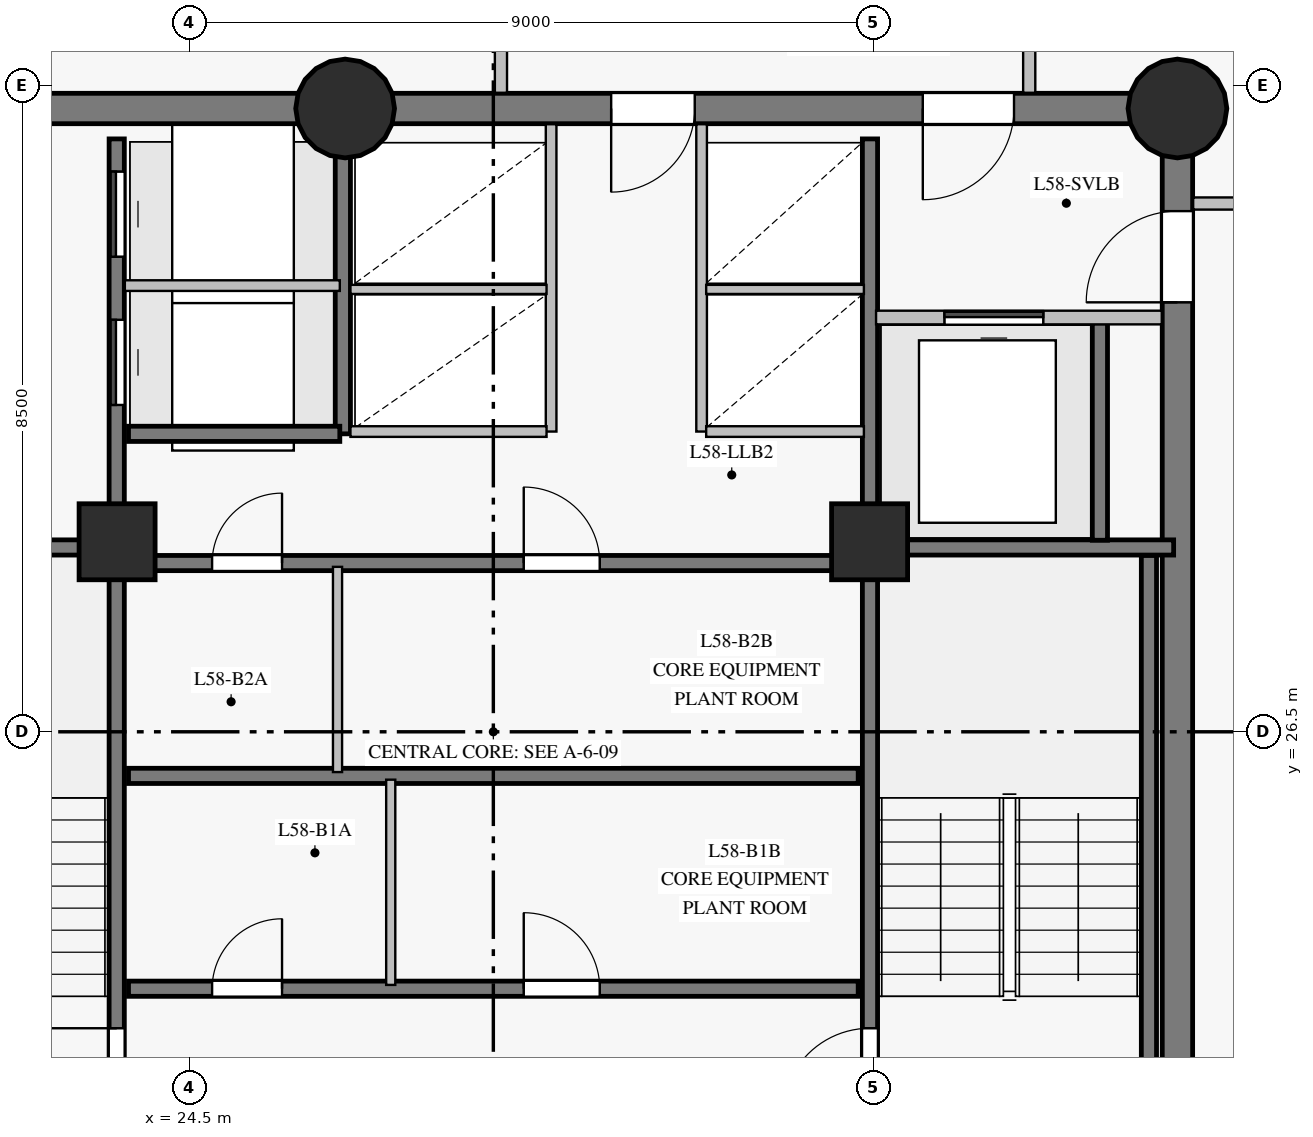
"""IFC4 building model, lengths in metres.
Left out: names, types, materials, properties, quantities, classifications, styles, units other than length and angle.
Written with IfcOpenShell. Run it as: python <this file> out.ifc"""

import sys

from ifc_helpers import new_model, si_unit, direction, frame, frame_2d, origin, origin_with_axes, origin_2d, place, context, subcontext, project, spatial, rectangle, circle, extrude, source, transform, mapped, element, fill, save


model = new_model("IFC4")
c1 = context("Model", 3, precision=1e-05, world=origin(), true_north=direction((0.0, 1.0)))
c2 = subcontext(c1, "Body", "Model", "MODEL_VIEW")
j1 = project(units=[si_unit("LENGTHUNIT", "METRE"), si_unit("PLANEANGLEUNIT", "RADIAN")], contexts=[c1])
p1 = place(None, origin())
s1 = spatial("IfcSite", under=j1, at=p1, CompositionType="ELEMENT")
p2 = place(p1, origin())
s2 = spatial("IfcBuilding", under=s1, at=p2, CompositionType="ELEMENT")
p3 = place(p2, frame((0.0, 0.0, 199.25)))
s3 = spatial("IfcBuildingStorey", under=s2, at=p3, CompositionType="ELEMENT", Elevation=199.25)
p4 = place(p3, frame((37.5, 18.3, 0.0), z_axis=(0.0, 0.0, 1.0), x_axis=(0.0, 1.0, 0.0)))
e1 = element("IfcWall", 1, at=p4, inside=s3, PredefinedType="SHEAR", context=c2, shape_type="SweptSolid", body=[
    extrude(rectangle(XDim=16.4, YDim=0.4, at=frame_2d((8.2, 0.0))), origin(), (0.0, 0.0, 1.0), 2.825),
])
p5 = place(p4, frame((13.85, 0.0, 0.0)))
e2 = element("IfcOpeningElement", 2, at=p5, cuts=e1, PredefinedType="OPENING", context=c2, shape_type="SweptSolid", body=[
    extrude(rectangle(XDim=1.2, YDim=2.15, at=frame_2d((0.6, 1.075))), frame((0.0, 0.21, 0.0), z_axis=(0.0, -1.0, 0.0), x_axis=(1.0, 0.0, 0.0)), (0.0, 0.0, 1.0), 0.42),
])
p6 = place(p3, frame((37.5, 34.7, 0.0), z_axis=(0.0, 0.0, 1.0), x_axis=(-1.0, 0.0, 0.0)))
e3 = element("IfcWall", 3, at=p6, inside=s3, PredefinedType="SHEAR", context=c2, shape_type="SweptSolid", body=[
    extrude(rectangle(XDim=10.95, YDim=0.4, at=frame_2d((5.475, 0.0))), origin(), (0.0, 0.0, 1.0), 2.825),
])
p7 = place(p6, frame((2.15, 0.0, 0.0)))
e4 = element("IfcOpeningElement", 4, at=p7, cuts=e3, PredefinedType="OPENING", context=c2, shape_type="SweptSolid", body=[
    extrude(rectangle(XDim=1.2, YDim=2.15, at=frame_2d((0.6, 1.075))), frame((0.0, 0.21, 0.0), z_axis=(0.0, -1.0, 0.0), x_axis=(1.0, 0.0, 0.0)), (0.0, 0.0, 1.0), 0.42),
])
p8 = place(p6, frame((6.35, 0.0, 0.0)))
e5 = element("IfcOpeningElement", 5, at=p8, cuts=e3, PredefinedType="OPENING", context=c2, shape_type="SweptSolid", body=[
    extrude(rectangle(XDim=1.1, YDim=2.15, at=frame_2d((0.55, 1.075))), frame((0.0, 0.21, 0.0), z_axis=(0.0, -1.0, 0.0), x_axis=(1.0, 0.0, 0.0)), (0.0, 0.0, 1.0), 0.42),
])
p9 = place(p3, frame((26.55, 34.7, 0.0), z_axis=(0.0, 0.0, 1.0), x_axis=(-1.0, 0.0, 0.0)))
e6 = element("IfcWall", 6, at=p9, inside=s3, PredefinedType="SHEAR", context=c2, shape_type="SweptSolid", body=[
    extrude(rectangle(XDim=7.05, YDim=0.4, at=frame_2d((3.525, 0.0))), origin(), (0.0, 0.0, 1.0), 2.825),
])
m1 = source(origin_with_axes(), c2, "Body", "SweptSolid", [
    extrude(circle(Radius=0.65, at=origin_2d()), origin(), (0.0, 0.0, 1.0), 3.05),
])
for number, where, z_axis, x_axis in (
    (7, (26.55, 34.7, 0.0), (0.0, 0.0, 1.0), (1.0, 0.0, 0.0)),
    (8, (37.5, 34.7, 0.0), (0.0, 0.0, 1.0), (1.0, 0.0, 0.0)),
):
    element("IfcColumn", number, at=place(p3, frame(where, z_axis=z_axis, x_axis=x_axis)), inside=s3, PredefinedType="COLUMN", context=c2, shape_type="MappedRepresentation", body=[
        mapped(m1, transform((0.0, 0.0, 0.0), scale=1.0)),
    ])
m2 = source(origin_with_axes(), c2, "Body", "SweptSolid", [
    extrude(rectangle(XDim=1.0, YDim=1.0, at=origin_2d()), origin(), (0.0, 0.0, 1.0), 3.05),
])
for number, where, z_axis, x_axis in (
    (9, (23.55, 29.0, 0.0), (0.0, 0.0, 1.0), (1.0, 0.0, 0.0)),
    (10, (33.45, 29.0, 0.0), (0.0, 0.0, 1.0), (1.0, 0.0, 0.0)),
):
    element("IfcColumn", number, at=place(p3, frame(where, z_axis=z_axis, x_axis=x_axis)), inside=s3, PredefinedType="COLUMN", context=c2, shape_type="MappedRepresentation", body=[
        mapped(m2, transform((0.0, 0.0, 0.0), scale=1.0)),
    ])
p10 = place(p3, frame((23.545, 18.7, 0.0), z_axis=(0.0, 0.0, 1.0), x_axis=(0.0, 1.0, 0.0)))
e11 = element("IfcWall", 11, at=p10, inside=s3, PredefinedType="SHEAR", context=c2, shape_type="SweptSolid", body=[
    extrude(rectangle(XDim=15.6, YDim=0.2, at=frame_2d((7.8, 0.0))), origin(), (0.0, 0.0, 1.0), 2.825),
])
p11 = place(p10, frame((2.75, 0.0, 0.0)))
e12 = element("IfcOpeningElement", 12, at=p11, cuts=e11, PredefinedType="OPENING", context=c2, shape_type="SweptSolid", body=[
    extrude(rectangle(XDim=1.15, YDim=2.15, at=frame_2d((0.575, 1.075))), frame((0.0, 0.11, 0.0), z_axis=(0.0, -1.0, 0.0), x_axis=(1.0, 0.0, 0.0)), (0.0, 0.0, 1.0), 0.22),
])
p12 = place(p10, frame((0.14, 0.0, 0.0)))
e13 = element("IfcOpeningElement", 13, at=p12, cuts=e11, PredefinedType="OPENING", context=c2, shape_type="SweptSolid", body=[
    extrude(rectangle(XDim=0.88, YDim=2.1, at=frame_2d((0.44, 1.05))), frame((0.0, 0.11, 0.0), z_axis=(0.0, -1.0, 0.0), x_axis=(1.0, 0.0, 0.0)), (0.0, 0.0, 1.0), 0.22),
])
p13 = place(p10, frame((1.36, 0.0, 0.0)))
e14 = element("IfcOpeningElement", 14, at=p13, cuts=e11, PredefinedType="OPENING", context=c2, shape_type="SweptSolid", body=[
    extrude(rectangle(XDim=0.88, YDim=2.1, at=frame_2d((0.44, 1.05))), frame((0.0, 0.11, 0.0), z_axis=(0.0, -1.0, 0.0), x_axis=(1.0, 0.0, 0.0)), (0.0, 0.0, 1.0), 0.22),
])
p14 = place(p10, frame((12.1, 0.0, 0.0)))
e15 = element("IfcOpeningElement", 15, at=p14, cuts=e11, PredefinedType="OPENING", context=c2, shape_type="SweptSolid", body=[
    extrude(rectangle(XDim=1.12, YDim=2.15, at=frame_2d((0.56, 1.075))), frame((0.0, 0.11, 0.0), z_axis=(0.0, -1.0, 0.0), x_axis=(1.0, 0.0, 0.0)), (0.0, 0.0, 1.0), 0.22),
])
p15 = place(p10, frame((14.05, 0.0, 0.0)))
e16 = element("IfcOpeningElement", 16, at=p15, cuts=e11, PredefinedType="OPENING", context=c2, shape_type="SweptSolid", body=[
    extrude(rectangle(XDim=1.12, YDim=2.15, at=frame_2d((0.56, 1.075))), frame((0.0, 0.11, 0.0), z_axis=(0.0, -1.0, 0.0), x_axis=(1.0, 0.0, 0.0)), (0.0, 0.0, 1.0), 0.22),
])
p16 = place(p3, frame((33.455, 18.7, 0.0), z_axis=(0.0, 0.0, 1.0), x_axis=(0.0, 1.0, 0.0)))
e17 = element("IfcWall", 17, at=p16, inside=s3, PredefinedType="SHEAR", context=c2, shape_type="SweptSolid", body=[
    extrude(rectangle(XDim=15.6, YDim=0.2, at=frame_2d((7.8, 0.0))), origin(), (0.0, 0.0, 1.0), 2.825),
])
p17 = place(p16, frame((2.75, 0.0, 0.0)))
e18 = element("IfcOpeningElement", 18, at=p17, cuts=e17, PredefinedType="OPENING", context=c2, shape_type="SweptSolid", body=[
    extrude(rectangle(XDim=1.15, YDim=2.15, at=frame_2d((0.575, 1.075))), frame((0.0, 0.11, 0.0), z_axis=(0.0, -1.0, 0.0), x_axis=(1.0, 0.0, 0.0)), (0.0, 0.0, 1.0), 0.22),
])
p18 = place(p16, frame((0.55, 0.0, 0.0)))
e19 = element("IfcOpeningElement", 19, at=p18, cuts=e17, PredefinedType="OPENING", context=c2, shape_type="SweptSolid", body=[
    extrude(rectangle(XDim=0.94, YDim=2.1, at=frame_2d((0.47, 1.05))), frame((0.0, 0.11, 0.0), z_axis=(0.0, -1.0, 0.0), x_axis=(1.0, 0.0, 0.0)), (0.0, 0.0, 1.0), 0.22),
])
p19 = place(p3, frame((23.7, 23.12, 0.0), z_axis=(0.0, 0.0, 1.0), x_axis=(1.0, 0.0, 0.0)))
e20 = element("IfcWall", 20, at=p19, inside=s3, PredefinedType="SHEAR", context=c2, shape_type="SweptSolid", body=[
    extrude(rectangle(XDim=9.6, YDim=0.2, at=frame_2d((4.8, 0.0))), origin(), (0.0, 0.0, 1.0), 2.825),
])
p20 = place(p19, frame((1.1, 0.0, 0.0)))
e21 = element("IfcOpeningElement", 21, at=p20, cuts=e20, PredefinedType="OPENING", context=c2, shape_type="SweptSolid", body=[
    extrude(rectangle(XDim=0.92, YDim=2.1, at=frame_2d((0.46, 1.05))), frame((0.0, 0.11, 0.0), z_axis=(0.0, -1.0, 0.0), x_axis=(1.0, 0.0, 0.0)), (0.0, 0.0, 1.0), 0.22),
])
p21 = place(p19, frame((5.2, 0.0, 0.0)))
e22 = element("IfcOpeningElement", 22, at=p21, cuts=e20, PredefinedType="OPENING", context=c2, shape_type="SweptSolid", body=[
    extrude(rectangle(XDim=1.0, YDim=2.15, at=frame_2d((0.5, 1.075))), frame((0.0, 0.11, 0.0), z_axis=(0.0, -1.0, 0.0), x_axis=(1.0, 0.0, 0.0)), (0.0, 0.0, 1.0), 0.22),
])
p22 = place(p3, frame((23.7, 25.92, 0.0), z_axis=(0.0, 0.0, 1.0), x_axis=(1.0, 0.0, 0.0)))
e23 = element("IfcWall", 23, at=p22, inside=s3, PredefinedType="SHEAR", context=c2, shape_type="SweptSolid", body=[
    extrude(rectangle(XDim=9.6, YDim=0.2, at=frame_2d((4.8, 0.0))), origin(), (0.0, 0.0, 1.0), 2.825),
])
p23 = place(p3, frame((23.7, 28.72, 0.0), z_axis=(0.0, 0.0, 1.0), x_axis=(1.0, 0.0, 0.0)))
e24 = element("IfcWall", 24, at=p23, inside=s3, PredefinedType="SHEAR", context=c2, shape_type="SweptSolid", body=[
    extrude(rectangle(XDim=9.6, YDim=0.2, at=frame_2d((4.8, 0.0))), origin(), (0.0, 0.0, 1.0), 2.825),
])
p24 = place(p23, frame((1.1, 0.0, 0.0)))
e25 = element("IfcOpeningElement", 25, at=p24, cuts=e24, PredefinedType="OPENING", context=c2, shape_type="SweptSolid", body=[
    extrude(rectangle(XDim=0.92, YDim=2.1, at=frame_2d((0.46, 1.05))), frame((0.0, 0.11, 0.0), z_axis=(0.0, -1.0, 0.0), x_axis=(1.0, 0.0, 0.0)), (0.0, 0.0, 1.0), 0.22),
])
p25 = place(p23, frame((5.2, 0.0, 0.0)))
e26 = element("IfcOpeningElement", 26, at=p25, cuts=e24, PredefinedType="OPENING", context=c2, shape_type="SweptSolid", body=[
    extrude(rectangle(XDim=1.0, YDim=2.15, at=frame_2d((0.5, 1.075))), frame((0.0, 0.11, 0.0), z_axis=(0.0, -1.0, 0.0), x_axis=(1.0, 0.0, 0.0)), (0.0, 0.0, 1.0), 0.22),
])
p26 = place(p3, frame((37.125, 21.32, 0.0), z_axis=(0.0, 0.0, 1.0), x_axis=(0.0, 1.0, 0.0)))
e27 = element("IfcWall", 27, at=p26, inside=s3, PredefinedType="SHEAR", context=c2, shape_type="SweptSolid", body=[
    extrude(rectangle(XDim=7.5, YDim=0.2, at=frame_2d((3.75, 0.0))), origin(), (0.0, 0.0, 1.0), 2.825),
])
for number, where, z_axis, x_axis in (
    (28, (33.455, 28.925, 0.0), (0.0, 0.0, 1.0), (1.0, 0.0, 0.0)),
    (29, (19.55, 28.925, 0.0), (0.0, 0.0, 1.0), (1.0, 0.0, 0.0)),
):
    element("IfcWall", number, at=place(p3, frame(where, z_axis=z_axis, x_axis=x_axis)), inside=s3, PredefinedType="SHEAR", context=c2, shape_type="SweptSolid", body=[
        extrude(rectangle(XDim=3.995, YDim=0.2, at=frame_2d((1.998, 0.0))), origin(), (0.0, 0.0, 1.0), 2.825),
    ])
p27 = place(p3, frame((26.52, 30.42, 0.0), z_axis=(0.0, 0.0, 1.0), x_axis=(0.0, 1.0, 0.0)))
e30 = element("IfcWall", 30, at=p27, inside=s3, PredefinedType="SHEAR", context=c2, shape_type="SweptSolid", body=[
    extrude(rectangle(XDim=3.86, YDim=0.2, at=frame_2d((1.93, 0.0))), origin(), (0.0, 0.0, 1.0), 2.825),
])
p28 = place(p3, frame((36.48, 29.02, 0.0), z_axis=(0.0, 0.0, 1.0), x_axis=(0.0, 1.0, 0.0)))
e31 = element("IfcWall", 31, at=p28, inside=s3, PredefinedType="SHEAR", context=c2, shape_type="SweptSolid", body=[
    extrude(rectangle(XDim=2.86, YDim=0.2, at=frame_2d((1.43, 0.0))), origin(), (0.0, 0.0, 1.0), 2.825),
])
p29 = place(p3, frame((23.7, 30.42, 0.0), z_axis=(0.0, 0.0, 1.0), x_axis=(1.0, 0.0, 0.0)))
e32 = element("IfcWall", 32, at=p29, inside=s3, PredefinedType="SHEAR", context=c2, shape_type="SweptSolid", body=[
    extrude(rectangle(XDim=2.78, YDim=0.2, at=frame_2d((1.39, 0.0))), origin(), (0.0, 0.0, 1.0), 2.825),
])
p30 = place(p3, frame((37.707, 33.45, 0.0), z_axis=(0.0, 0.0, 1.0), x_axis=(1.0, 0.0, 0.0)))
e33 = element("IfcWall", 33, at=p30, inside=s3, PredefinedType="PARTITIONING", context=c2, shape_type="SweptSolid", body=[
    extrude(rectangle(XDim=4.093, YDim=0.16, at=frame_2d((2.046, 0.0))), origin(), (0.0, 0.0, 1.0), 2.825),
])
for number, where, z_axis, x_axis in (
    (34, (29.26, 30.45, 0.0), (0.0, 0.0, 1.0), (0.0, 1.0, 0.0)),
    (35, (31.24, 30.45, 0.0), (0.0, 0.0, 1.0), (0.0, 1.0, 0.0)),
):
    element("IfcWall", number, at=place(p3, frame(where, z_axis=z_axis, x_axis=x_axis)), inside=s3, PredefinedType="PARTITIONING", context=c2, shape_type="SweptSolid", body=[
        extrude(rectangle(XDim=4.043, YDim=0.14, at=frame_2d((2.021, 0.0))), origin(), (0.0, 0.0, 1.0), 2.825),
    ])
p31 = place(p3, frame((33.535, 31.95, 0.0), z_axis=(0.0, 0.0, 1.0), x_axis=(1.0, 0.0, 0.0)))
e36 = element("IfcWall", 36, at=p31, inside=s3, PredefinedType="PARTITIONING", context=c2, shape_type="SweptSolid", body=[
    extrude(rectangle(XDim=3.759, YDim=0.18, at=frame_2d((1.879, 0.0))), origin(), (0.0, 0.0, 1.0), 2.825),
])
p32 = place(p31, frame((0.9, 0.0, 0.0)))
e37 = element("IfcOpeningElement", 37, at=p32, cuts=e36, PredefinedType="OPENING", context=c2, shape_type="SweptSolid", body=[
    extrude(rectangle(XDim=1.3, YDim=2.2, at=frame_2d((0.65, 1.1))), frame((0.0, 0.1, 0.0), z_axis=(0.0, -1.0, 0.0), x_axis=(1.0, 0.0, 0.0)), (0.0, 0.0, 1.0), 0.2),
])
p33 = place(p3, frame((23.652, 32.37, 0.0), z_axis=(0.0, 0.0, 1.0), x_axis=(1.0, 0.0, 0.0)))
e38 = element("IfcWall", 38, at=p33, inside=s3, PredefinedType="PARTITIONING", context=c2, shape_type="SweptSolid", body=[
    extrude(rectangle(XDim=2.828, YDim=0.14, at=frame_2d((1.414, 0.0))), origin(), (0.0, 0.0, 1.0), 2.825),
])
p34 = place(p3, frame((27.15, 23.17, 0.0), z_axis=(0.0, 0.0, 1.0), x_axis=(0.0, 1.0, 0.0)))
e39 = element("IfcWall", 39, at=p34, inside=s3, PredefinedType="PARTITIONING", context=c2, shape_type="SweptSolid", body=[
    extrude(rectangle(XDim=2.7, YDim=0.12, at=frame_2d((1.35, 0.0))), origin(), (0.0, 0.0, 1.0), 2.825),
])
p35 = place(p3, frame((26.45, 25.97, 0.0), z_axis=(0.0, 0.0, 1.0), x_axis=(0.0, 1.0, 0.0)))
e40 = element("IfcWall", 40, at=p35, inside=s3, PredefinedType="PARTITIONING", context=c2, shape_type="SweptSolid", body=[
    extrude(rectangle(XDim=2.7, YDim=0.12, at=frame_2d((1.35, 0.0))), origin(), (0.0, 0.0, 1.0), 2.825),
])
p36 = place(p3, frame((26.62, 30.45, 0.0), z_axis=(0.0, 0.0, 1.0), x_axis=(1.0, 0.0, 0.0)))
e41 = element("IfcWall", 41, at=p36, inside=s3, PredefinedType="PARTITIONING", context=c2, shape_type="SweptSolid", body=[
    extrude(rectangle(XDim=2.58, YDim=0.14, at=frame_2d((1.29, 0.0))), origin(), (0.0, 0.0, 1.0), 2.825),
])
p37 = place(p3, frame((26.62, 32.32, 0.0), z_axis=(0.0, 0.0, 1.0), x_axis=(1.0, 0.0, 0.0)))
e42 = element("IfcWall", 42, at=p37, inside=s3, PredefinedType="PARTITIONING", context=c2, shape_type="SweptSolid", body=[
    extrude(rectangle(XDim=2.58, YDim=0.12, at=frame_2d((1.29, 0.0))), origin(), (0.0, 0.0, 1.0), 2.825),
])
p38 = place(p3, frame((31.3, 30.45, 0.0), z_axis=(0.0, 0.0, 1.0), x_axis=(1.0, 0.0, 0.0)))
e43 = element("IfcWall", 43, at=p38, inside=s3, PredefinedType="PARTITIONING", context=c2, shape_type="SweptSolid", body=[
    extrude(rectangle(XDim=2.075, YDim=0.14, at=frame_2d((1.038, 0.0))), origin(), (0.0, 0.0, 1.0), 2.825),
])
p39 = place(p3, frame((31.3, 32.32, 0.0), z_axis=(0.0, 0.0, 1.0), x_axis=(1.0, 0.0, 0.0)))
e44 = element("IfcWall", 44, at=p39, inside=s3, PredefinedType="PARTITIONING", context=c2, shape_type="SweptSolid", body=[
    extrude(rectangle(XDim=2.075, YDim=0.12, at=frame_2d((1.038, 0.0))), origin(), (0.0, 0.0, 1.0), 2.825),
])
for number, where, z_axis, x_axis in (
    (45, (28.6, 34.907, 0.0), (0.0, 0.0, 1.0), (0.0, 1.0, 0.0)),
    (46, (35.55, 36.4, 0.0), (0.0, 0.0, 1.0), (0.0, -1.0, 0.0)),
):
    element("IfcWall", number, at=place(p3, frame(where, z_axis=z_axis, x_axis=x_axis)), inside=s3, PredefinedType="PARTITIONING", context=c2, shape_type="SweptSolid", body=[
        extrude(rectangle(XDim=1.493, YDim=0.16, at=frame_2d((0.747, 0.0))), origin(), (0.0, 0.0, 1.0), 2.825),
    ])
m3 = source(origin_with_axes(), c2, "Body", "SweptSolid", [
    extrude(rectangle(XDim=1.15, YDim=2.15, at=frame_2d((0.575, 1.075))), frame((0.0, 0.025, 0.0), z_axis=(0.0, -1.0, 0.0), x_axis=(1.0, 0.0, 0.0)), (0.0, 0.0, 1.0), 0.05),
])
p40 = place(p11, origin())
e47 = element("IfcDoor", 47, at=p40, inside=s3, OperationType="SINGLE_SWING_RIGHT", PredefinedType="DOOR", context=c2, shape_type="MappedRepresentation", body=[
    mapped(m3, transform((0.0, 0.0, 0.0), scale=1.0)),
])
fill(e12, e47)
p41 = place(p17, origin())
e48 = element("IfcDoor", 48, at=p41, inside=s3, OperationType="SINGLE_SWING_LEFT", PredefinedType="DOOR", context=c2, shape_type="MappedRepresentation", body=[
    mapped(m3, transform((0.0, 0.0, 0.0), scale=1.0)),
])
fill(e18, e48)
m4 = source(origin_with_axes(), c2, "Body", "SweptSolid", [
    extrude(rectangle(XDim=1.2, YDim=2.15, at=frame_2d((0.6, 1.075))), frame((0.0, 0.025, 0.0), z_axis=(0.0, -1.0, 0.0), x_axis=(1.0, 0.0, 0.0)), (0.0, 0.0, 1.0), 0.05),
])
p42 = place(p5, origin())
e49 = element("IfcDoor", 49, at=p42, inside=s3, OperationType="SINGLE_SWING_LEFT", PredefinedType="DOOR", context=c2, shape_type="MappedRepresentation", body=[
    mapped(m4, transform((0.0, 0.0, 0.0), scale=1.0)),
])
fill(e2, e49)
p43 = place(p7, origin())
e50 = element("IfcDoor", 50, at=p43, inside=s3, OperationType="SINGLE_SWING_RIGHT", PredefinedType="DOOR", context=c2, shape_type="MappedRepresentation", body=[
    mapped(m4, transform((0.0, 0.0, 0.0), scale=1.0)),
])
fill(e4, e50)
m5 = source(origin_with_axes(), c2, "Body", "SweptSolid", [
    extrude(rectangle(XDim=1.3, YDim=2.2, at=frame_2d((0.65, 1.1))), frame((0.0, 0.025, 0.0), z_axis=(0.0, -1.0, 0.0), x_axis=(1.0, 0.0, 0.0)), (0.0, 0.0, 1.0), 0.05),
])
p44 = place(p32, origin())
e51 = element("IfcDoor", 51, at=p44, inside=s3, OperationType="SLIDING_TO_LEFT", PredefinedType="DOOR", context=c2, shape_type="MappedRepresentation", body=[
    mapped(m5, transform((0.0, 0.0, 0.0), scale=1.0)),
])
fill(e37, e51)
m6 = source(origin_with_axes(), c2, "Body", "SweptSolid", [
    extrude(rectangle(XDim=0.92, YDim=2.1, at=frame_2d((0.46, 1.05))), frame((0.0, 0.025, 0.0), z_axis=(0.0, -1.0, 0.0), x_axis=(1.0, 0.0, 0.0)), (0.0, 0.0, 1.0), 0.05),
])
p45 = place(p20, origin())
e52 = element("IfcDoor", 52, at=p45, inside=s3, OperationType="SINGLE_SWING_RIGHT", PredefinedType="DOOR", context=c2, shape_type="MappedRepresentation", body=[
    mapped(m6, transform((0.0, 0.0, 0.0), scale=1.0)),
])
fill(e21, e52)
m7 = source(origin_with_axes(), c2, "Body", "SweptSolid", [
    extrude(rectangle(XDim=1.0, YDim=2.15, at=frame_2d((0.5, 1.075))), frame((0.0, 0.025, 0.0), z_axis=(0.0, -1.0, 0.0), x_axis=(1.0, 0.0, 0.0)), (0.0, 0.0, 1.0), 0.05),
])
p46 = place(p21, origin())
e53 = element("IfcDoor", 53, at=p46, inside=s3, OperationType="SINGLE_SWING_LEFT", PredefinedType="DOOR", context=c2, shape_type="MappedRepresentation", body=[
    mapped(m7, transform((0.0, 0.0, 0.0), scale=1.0)),
])
fill(e22, e53)
p47 = place(p24, origin())
e54 = element("IfcDoor", 54, at=p47, inside=s3, OperationType="SINGLE_SWING_RIGHT", PredefinedType="DOOR", context=c2, shape_type="MappedRepresentation", body=[
    mapped(m6, transform((0.0, 0.0, 0.0), scale=1.0)),
])
fill(e25, e54)
p48 = place(p25, origin())
e55 = element("IfcDoor", 55, at=p48, inside=s3, OperationType="SINGLE_SWING_LEFT", PredefinedType="DOOR", context=c2, shape_type="MappedRepresentation", body=[
    mapped(m7, transform((0.0, 0.0, 0.0), scale=1.0)),
])
fill(e26, e55)
m8 = source(origin_with_axes(), c2, "Body", "SweptSolid", [
    extrude(rectangle(XDim=1.1, YDim=2.15, at=frame_2d((0.55, 1.075))), frame((0.0, 0.025, 0.0), z_axis=(0.0, -1.0, 0.0), x_axis=(1.0, 0.0, 0.0)), (0.0, 0.0, 1.0), 0.05),
])
p49 = place(p8, origin())
e56 = element("IfcDoor", 56, at=p49, inside=s3, OperationType="SINGLE_SWING_RIGHT", PredefinedType="DOOR", context=c2, shape_type="MappedRepresentation", body=[
    mapped(m8, transform((0.0, 0.0, 0.0), scale=1.0)),
])
fill(e5, e56)
m9 = source(origin_with_axes(), c2, "Body", "SweptSolid", [
    extrude(rectangle(XDim=1.12, YDim=2.15, at=frame_2d((0.56, 1.075))), frame((0.0, 0.025, 0.0), z_axis=(0.0, -1.0, 0.0), x_axis=(1.0, 0.0, 0.0)), (0.0, 0.0, 1.0), 0.05),
])
p50 = place(p14, origin())
e57 = element("IfcDoor", 57, at=p50, inside=s3, OperationType="SLIDING_TO_LEFT", PredefinedType="DOOR", context=c2, shape_type="MappedRepresentation", body=[
    mapped(m9, transform((0.0, 0.0, 0.0), scale=1.0)),
])
fill(e15, e57)
p51 = place(p15, origin())
e58 = element("IfcDoor", 58, at=p51, inside=s3, OperationType="SLIDING_TO_RIGHT", PredefinedType="DOOR", context=c2, shape_type="MappedRepresentation", body=[
    mapped(m9, transform((0.0, 0.0, 0.0), scale=1.0)),
])
fill(e16, e58)
save(model, sys.argv[1])
